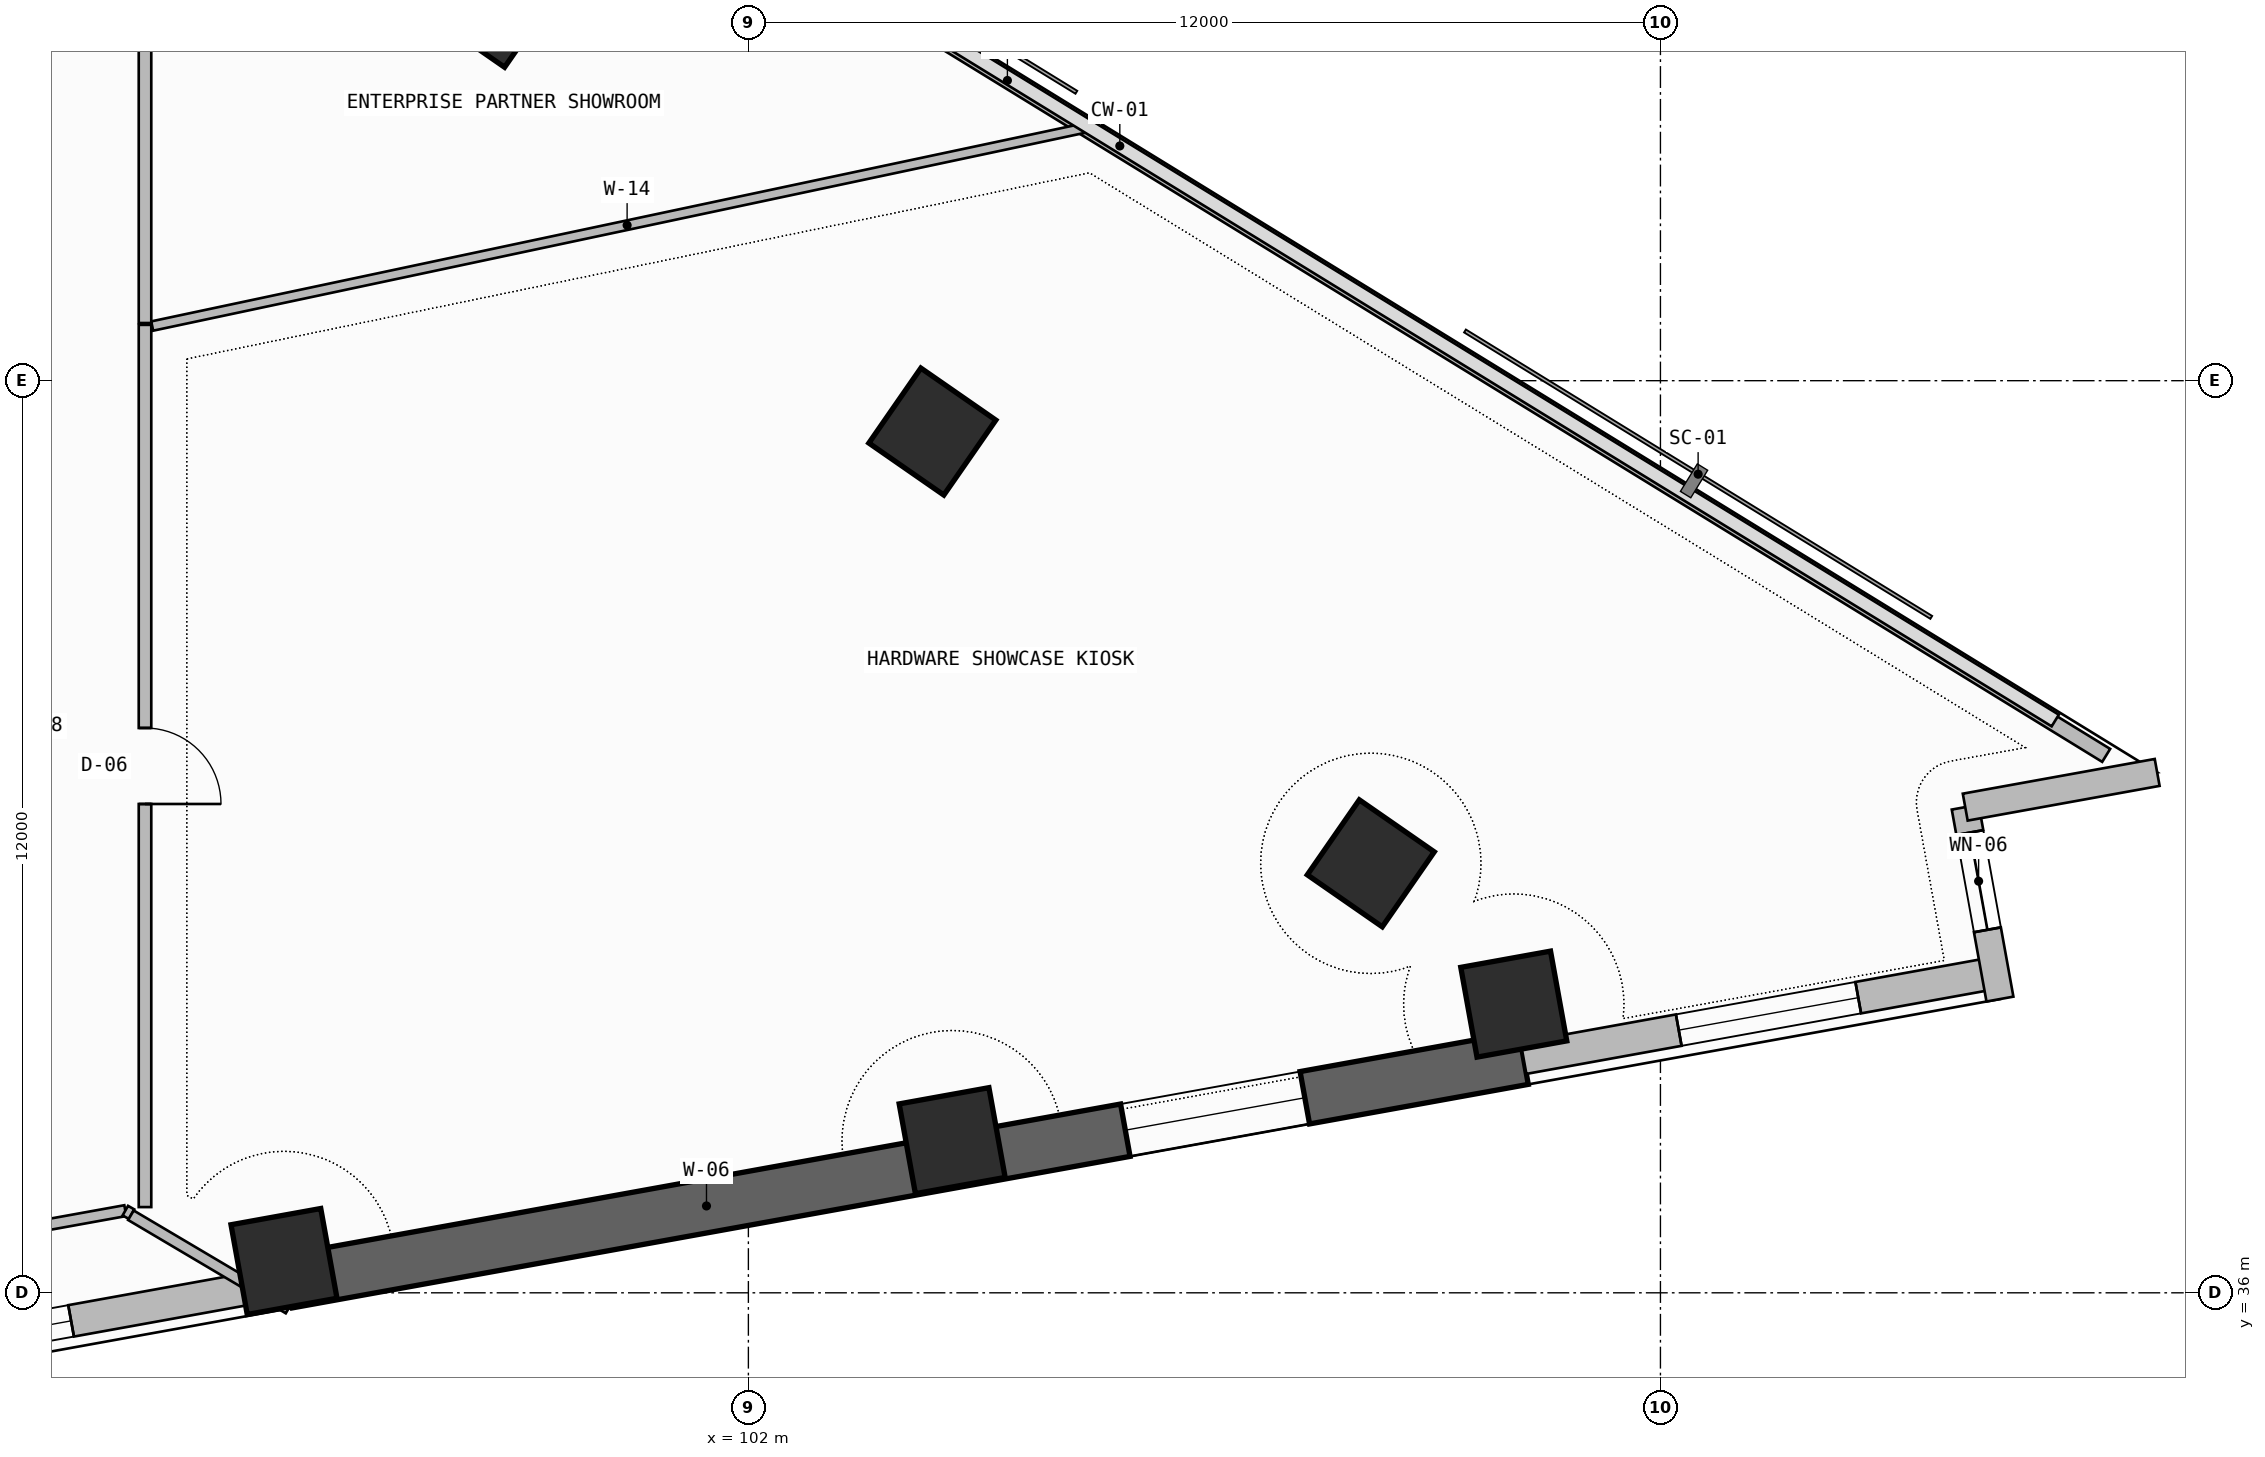
"""IFC4 building model, lengths in metres.
Left out: names, types, materials, properties, quantities, classifications, styles, units other than length and angle.
Written with IfcOpenShell. Run it as: python <this file> out.ifc"""

import sys

from ifc_helpers import new_model, si_unit, direction, frame, frame_2d, origin, origin_2d, place, context, subcontext, project, spatial, rectangle, extrude, element, fill, save


model = new_model("IFC4")
c1 = context("Model", 3, precision=1e-05, world=origin(), true_north=direction((0.0, 1.0)))
c2 = subcontext(c1, "Body", "Model", "MODEL_VIEW")
j1 = project(units=[si_unit("LENGTHUNIT", "METRE"), si_unit("PLANEANGLEUNIT", "RADIAN")], contexts=[c1])
p1 = place(None, origin())
s1 = spatial("IfcSite", under=j1, at=p1, CompositionType="ELEMENT")
p2 = place(p1, origin())
s2 = spatial("IfcBuilding", under=s1, at=p2, CompositionType="ELEMENT")
p3 = place(p2, frame((0.0, 0.0, 110.1)))
s3 = spatial("IfcBuildingStorey", under=s2, at=p3, CompositionType="ELEMENT", Elevation=110.1)
for number, where, z_axis, x_axis in (
    (1, (95.89, 36.412, 0.0), (0.0, 0.0, 1.0), (0.984, 0.178, 0.0)),
    (2, (104.681, 38.001, 0.0), (0.0, 0.0, 1.0), (0.984, 0.178, 0.0)),
    (3, (112.07, 39.798, 0.0), (0.0, 0.0, 1.0), (0.984, 0.178, 0.0)),
    (4, (110.189, 41.65, 0.0), (0.0, 0.0, 1.0), (0.57, 0.822, 0.0)),
    (5, (104.42, 47.331, 0.0), (0.0, 0.0, 1.0), (0.57, 0.822, 0.0)),
    (6, (98.641, 52.958, 0.0), (0.0, 0.0, 1.0), (0.57, 0.822, 0.0)),
):
    element("IfcColumn", number, at=place(p3, frame(where, z_axis=z_axis, x_axis=x_axis)), inside=s3, PredefinedType="COLUMN", context=c2, shape_type="SweptSolid", body=[
        extrude(rectangle(XDim=1.2, YDim=1.2, at=origin_2d()), origin(), (0.0, 0.0, 1.0), 3.6),
    ])
p4 = place(p3, frame((86.1, 34.367, 0.0), z_axis=(0.0, 0.0, 1.0), x_axis=(0.9840437071, 0.177926902172, 0.0)))
e7 = element("IfcWall", 7, at=p4, inside=s3, PredefinedType="SOLIDWALL", context=c2, shape_type="SweptSolid", body=[
    extrude(rectangle(XDim=9.997, YDim=0.42, at=frame_2d((4.999, 0.0))), origin(), (0.0, 0.0, 1.0), 2.325),
])
p5 = place(p4, frame((4.702, 0.0, 1.2)))
e8 = element("IfcOpeningElement", 8, at=p5, cuts=e7, PredefinedType="OPENING", context=c2, shape_type="SweptSolid", body=[
    extrude(rectangle(XDim=2.4, YDim=0.9, at=frame_2d((1.2, 0.45))), frame((0.0, 0.22, 0.0), z_axis=(0.0, -1.0, 0.0), x_axis=(1.0, 0.0, 0.0)), (0.0, 0.0, 1.0), 0.44),
])
p6 = place(p3, frame((95.938, 36.146, -0.26), z_axis=(0.0, 0.0, 1.0), x_axis=(0.984038488288, 0.177955762952, 0.0)))
e9 = element("IfcWall", 9, at=p6, inside=s3, PredefinedType="SHEAR", context=c2, shape_type="SweptSolid", body=[
    extrude(rectangle(XDim=16.525, YDim=0.7, at=frame_2d((8.262, 0.0))), origin(), (0.0, 0.0, 1.0), 3.6),
])
p7 = place(p6, frame((11.2, 0.0, 1.2)))
e10 = element("IfcOpeningElement", 10, at=p7, cuts=e9, PredefinedType="OPENING", context=c2, shape_type="SweptSolid", body=[
    extrude(rectangle(XDim=2.4, YDim=0.9, at=frame_2d((1.2, 0.45))), frame((0.0, 0.36, 0.0), z_axis=(0.0, -1.0, 0.0), x_axis=(1.0, 0.0, 0.0)), (0.0, 0.0, 1.0), 0.72),
])
p8 = place(p3, frame((112.199, 39.087, 0.0), z_axis=(0.0, 0.0, 1.0), x_axis=(0.984042888215, 0.177931431042, 0.0)))
e11 = element("IfcWall", 11, at=p8, inside=s3, PredefinedType="SOLIDWALL", context=c2, shape_type="SweptSolid", body=[
    extrude(rectangle(XDim=6.306, YDim=0.42, at=frame_2d((3.153, 0.0))), origin(), (0.0, 0.0, 1.0), 3.34),
])
p9 = place(p8, frame((2.075, 0.0, 1.2)))
e12 = element("IfcOpeningElement", 12, at=p9, cuts=e11, PredefinedType="OPENING", context=c2, shape_type="SweptSolid", body=[
    extrude(rectangle(XDim=2.4, YDim=0.9, at=frame_2d((1.2, 0.45))), frame((0.0, 0.22, 0.0), z_axis=(0.0, -1.0, 0.0), x_axis=(1.0, 0.0, 0.0)), (0.0, 0.0, 1.0), 0.44),
])
p10 = place(p3, frame((118.467, 39.864, 0.0), z_axis=(0.0, 0.0, 1.0), x_axis=(-0.177897493713, 0.984049024048, 0.0)))
e13 = element("IfcWall", 13, at=p10, inside=s3, PredefinedType="SOLIDWALL", context=c2, shape_type="SweptSolid", body=[
    extrude(rectangle(XDim=2.566, YDim=0.36, at=frame_2d((1.283, 0.0))), origin(), (0.0, 0.0, 1.0), 3.34),
])
p11 = place(p10, frame((0.926, 0.0, 0.45)))
e14 = element("IfcOpeningElement", 14, at=p11, cuts=e13, PredefinedType="OPENING", context=c2, shape_type="SweptSolid", body=[
    extrude(rectangle(XDim=1.3, YDim=2.4, at=frame_2d((0.65, 1.2))), frame((0.0, 0.19, 0.0), z_axis=(0.0, -1.0, 0.0), x_axis=(1.0, 0.0, 0.0)), (0.0, 0.0, 1.0), 0.38),
])
p12 = place(p3, frame((118.01, 42.39, 0.0), z_axis=(0.0, 0.0, 1.0), x_axis=(0.984046012923, 0.177914149102, 0.0)))
e15 = element("IfcWall", 15, at=p12, inside=s3, PredefinedType="SOLIDWALL", context=c2, shape_type="SweptSolid", body=[
    extrude(rectangle(XDim=2.566, YDim=0.36, at=frame_2d((1.283, 0.0))), origin(), (0.0, 0.0, 1.0), 3.34),
])
p13 = place(p3, frame((119.865, 43.07, 0.0), z_axis=(0.0, 0.0, 1.0), x_axis=(-0.852110824326, 0.52336138859, 0.0)))
e16 = element("IfcWall", 16, at=p13, inside=s3, PredefinedType="PARAPET", context=c2, shape_type="SweptSolid", body=[
    extrude(rectangle(XDim=33.932, YDim=0.2, at=frame_2d((16.966, 0.0))), origin(), (0.0, 0.0, 1.0), 1.15),
])
p14 = place(p3, frame((91.961, 36.748, 0.0), z_axis=(0.0, 0.0, 1.0), x_axis=(0.984032355116, 0.177989674099, 0.0)))
e17 = element("IfcWall", 17, at=p14, inside=s3, PredefinedType="PARTITIONING", context=c2, shape_type="SweptSolid", body=[
    extrude(rectangle(XDim=1.871, YDim=0.145, at=frame_2d((0.936, 0.0))), origin(), (0.0, 0.0, 1.0), 3.34),
])
p15 = place(p3, frame((93.802, 37.081, 0.0), z_axis=(0.0, 0.0, 1.0), x_axis=(0.870320077179, -0.492486510739, 0.0)))
e18 = element("IfcWall", 18, at=p15, inside=s3, PredefinedType="PARTITIONING", context=c2, shape_type="SweptSolid", body=[
    extrude(rectangle(XDim=0.094, YDim=0.145, at=frame_2d((0.047, 0.0))), origin(), (0.0, 0.0, 1.0), 3.34),
])
p16 = place(p3, frame((93.876, 37.021, 0.0), z_axis=(0.0, 0.0, 1.0), x_axis=(0.860525041789, -0.509408139367, 0.0)))
e19 = element("IfcWall", 19, at=p16, inside=s3, PredefinedType="PARTITIONING", context=c2, shape_type="SweptSolid", body=[
    extrude(rectangle(XDim=2.411, YDim=0.145, at=frame_2d((1.205, 0.0))), origin(), (0.0, 0.0, 1.0), 2.725),
])
p17 = place(p3, frame((94.061, 37.128, 0.0), z_axis=(0.0, 0.0, 1.0), x_axis=(0.0, 1.0, 0.0)))
e20 = element("IfcWall", 20, at=p17, inside=s3, PredefinedType="PARTITIONING", context=c2, shape_type="SweptSolid", body=[
    extrude(rectangle(XDim=11.607, YDim=0.165, at=frame_2d((5.803, 0.0))), origin(), (0.0, 0.0, 1.0), 2.725),
])
p18 = place(p17, frame((5.303, 0.0, 0.0)))
e21 = element("IfcOpeningElement", 21, at=p18, cuts=e20, PredefinedType="OPENING", context=c2, shape_type="SweptSolid", body=[
    extrude(rectangle(XDim=1.0, YDim=2.2, at=frame_2d((0.5, 1.1))), frame((0.0, 0.093, 0.0), z_axis=(0.0, -1.0, 0.0), x_axis=(1.0, 0.0, 0.0)), (0.0, 0.0, 1.0), 0.185),
])
p19 = place(p3, frame((94.156, 48.719, 0.0), z_axis=(0.0, 0.0, 1.0), x_axis=(0.978192494571, 0.207700369679, 0.0)))
e22 = element("IfcWall", 22, at=p19, inside=s3, PredefinedType="PARTITIONING", context=c2, shape_type="SweptSolid", body=[
    extrude(rectangle(XDim=12.776, YDim=0.125, at=frame_2d((6.388, 0.0))), origin(), (0.0, 0.0, 1.0), 2.725),
])
p20 = place(p3, frame((94.061, 48.759, 0.0), z_axis=(0.0, 0.0, 1.0), x_axis=(0.0, 1.0, 0.0)))
e23 = element("IfcWall", 23, at=p20, inside=s3, PredefinedType="PARTITIONING", context=c2, shape_type="SweptSolid", body=[
    extrude(rectangle(XDim=9.761, YDim=0.165, at=frame_2d((4.88, 0.0))), origin(), (0.0, 0.0, 1.0), 2.725),
])
p21 = place(p20, frame((4.38, 0.0, 0.0)))
e24 = element("IfcOpeningElement", 24, at=p21, cuts=e23, PredefinedType="OPENING", context=c2, shape_type="SweptSolid", body=[
    extrude(rectangle(XDim=1.0, YDim=2.2, at=frame_2d((0.5, 1.1))), frame((0.0, 0.093, 0.0), z_axis=(0.0, -1.0, 0.0), x_axis=(1.0, 0.0, 0.0)), (0.0, 0.0, 1.0), 0.185),
])
p22 = place(p5, origin())
e25 = element("IfcWindow", 25, at=p22, inside=s3, PartitioningType="SINGLE_PANEL", PredefinedType="WINDOW", context=c2, shape_type="SweptSolid", body=[
    extrude(rectangle(XDim=2.4, YDim=0.9, at=frame_2d((1.2, 0.45))), frame((0.0, 0.03, 0.0), z_axis=(0.0, -1.0, 0.0), x_axis=(1.0, 0.0, 0.0)), (0.0, 0.0, 1.0), 0.06),
])
fill(e8, e25)
p23 = place(p7, origin())
e26 = element("IfcWindow", 26, at=p23, inside=s3, PartitioningType="SINGLE_PANEL", PredefinedType="WINDOW", context=c2, shape_type="SweptSolid", body=[
    extrude(rectangle(XDim=2.4, YDim=0.9, at=frame_2d((1.2, 0.45))), frame((0.0, 0.03, 0.0), z_axis=(0.0, -1.0, 0.0), x_axis=(1.0, 0.0, 0.0)), (0.0, 0.0, 1.0), 0.06),
])
fill(e10, e26)
p24 = place(p9, origin())
e27 = element("IfcWindow", 27, at=p24, inside=s3, PartitioningType="SINGLE_PANEL", PredefinedType="WINDOW", context=c2, shape_type="SweptSolid", body=[
    extrude(rectangle(XDim=2.4, YDim=0.9, at=frame_2d((1.2, 0.45))), frame((0.0, 0.03, 0.0), z_axis=(0.0, -1.0, 0.0), x_axis=(1.0, 0.0, 0.0)), (0.0, 0.0, 1.0), 0.06),
])
fill(e12, e27)
p25 = place(p11, origin())
e28 = element("IfcWindow", 28, at=p25, inside=s3, PartitioningType="SINGLE_PANEL", PredefinedType="WINDOW", context=c2, shape_type="SweptSolid", body=[
    extrude(rectangle(XDim=1.3, YDim=2.4, at=frame_2d((0.65, 1.2))), frame((0.0, 0.03, 0.0), z_axis=(0.0, -1.0, 0.0), x_axis=(1.0, 0.0, 0.0)), (0.0, 0.0, 1.0), 0.06),
])
fill(e14, e28)
p26 = place(p18, frame((1.0, 0.0, 0.0), z_axis=(0.0, 0.0, 1.0), x_axis=(-1.0, 0.0, 0.0)))
e29 = element("IfcDoor", 29, at=p26, inside=s3, OperationType="SINGLE_SWING_RIGHT", PredefinedType="DOOR", context=c2, shape_type="SweptSolid", body=[
    extrude(rectangle(XDim=1.0, YDim=2.2, at=frame_2d((0.5, 1.1))), frame((0.0, 0.025, 0.0), z_axis=(0.0, -1.0, 0.0), x_axis=(1.0, 0.0, 0.0)), (0.0, 0.0, 1.0), 0.05),
])
fill(e21, e29)
save(model, sys.argv[1])
